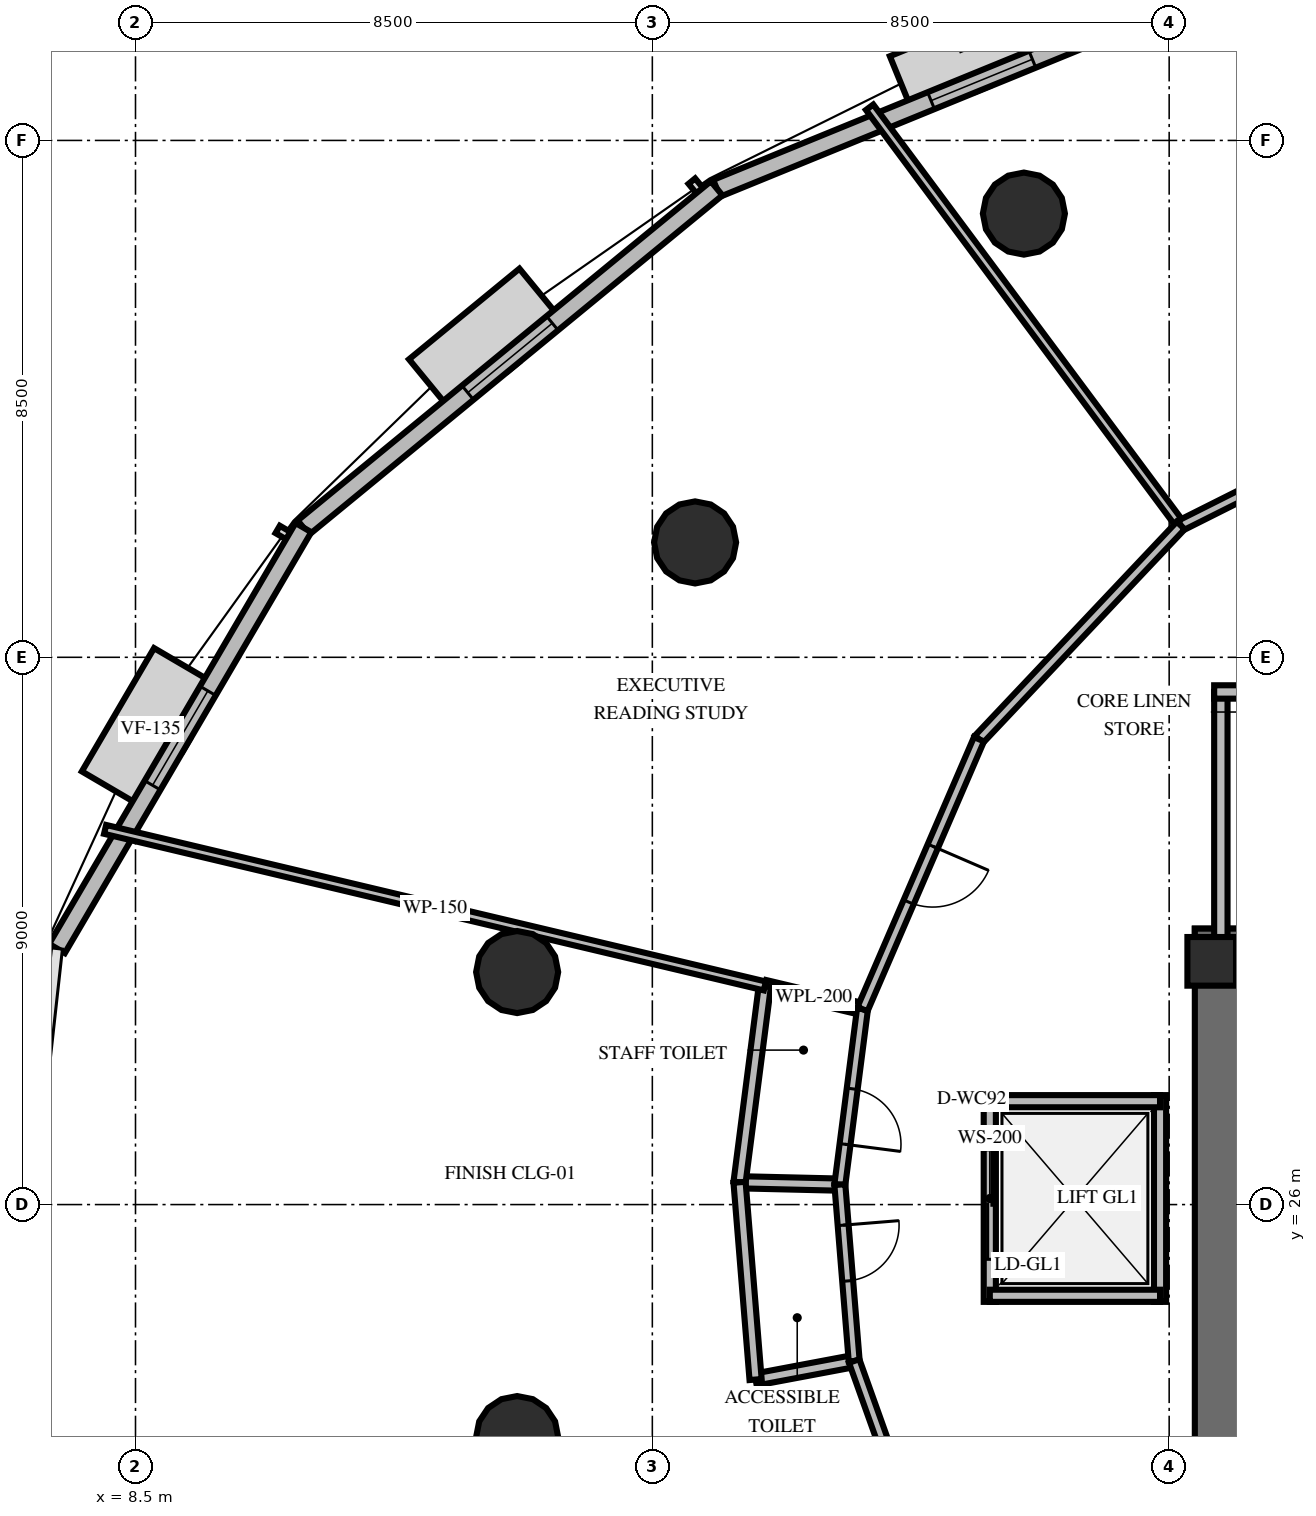
"""IFC4 building model, lengths in metres.
Left out: names, types, materials, properties, quantities, classifications, styles, units other than length and angle.
Written with IfcOpenShell. Run it as: python <this file> out.ifc"""

import sys

from ifc_helpers import new_model, si_unit, direction, frame, frame_2d, origin, origin_2d, place, context, subcontext, project, spatial, rectangle, circle, extrude, element, fill, save


model = new_model("IFC4")
c1 = context("Model", 3, precision=1e-05, world=origin(), true_north=direction((0.0, 1.0)))
c2 = subcontext(c1, "Body", "Model", "MODEL_VIEW")
j1 = project(units=[si_unit("LENGTHUNIT", "METRE"), si_unit("PLANEANGLEUNIT", "RADIAN")], contexts=[c1])
p1 = place(None, origin())
s1 = spatial("IfcSite", under=j1, at=p1, CompositionType="ELEMENT")
p2 = place(p1, origin())
s2 = spatial("IfcBuilding", under=s1, at=p2, CompositionType="ELEMENT")
p3 = place(p2, frame((0.0, 0.0, 59.4)))
s3 = spatial("IfcBuildingStorey", under=s2, at=p3, CompositionType="ELEMENT", Elevation=59.4)
p4 = place(p3, frame((25.922, 30.088, 0.0), z_axis=(0.0, 0.0, 1.0), x_axis=(1.0, 0.0, 0.0)))
e1 = element("IfcWall", 1, at=p4, inside=s3, PredefinedType="SHEAR", context=c2, shape_type="SweptSolid", body=[
    extrude(rectangle(XDim=16.166, YDim=0.9, at=frame_2d((8.083, 0.0))), origin(), (0.0, 0.0, 1.0), 4.2),
])
p5 = place(p4, frame((1.028, 0.0, 0.0)))
e2 = element("IfcOpeningElement", 2, at=p5, cuts=e1, PredefinedType="OPENING", context=c2, shape_type="SweptSolid", body=[
    extrude(rectangle(XDim=1.05, YDim=2.15, at=frame_2d((0.525, 1.075))), frame((0.0, 0.46, 0.0), z_axis=(0.0, -1.0, 0.0), x_axis=(1.0, 0.0, 0.0)), (0.0, 0.0, 1.0), 0.92),
])
p6 = place(p4, frame((14.078, 0.0, 0.0)))
e3 = element("IfcOpeningElement", 3, at=p6, cuts=e1, PredefinedType="OPENING", context=c2, shape_type="SweptSolid", body=[
    extrude(rectangle(XDim=1.05, YDim=2.15, at=frame_2d((0.525, 1.075))), frame((0.0, 0.46, 0.0), z_axis=(0.0, -1.0, 0.0), x_axis=(1.0, 0.0, 0.0)), (0.0, 0.0, 1.0), 0.92),
])
p7 = place(p4, frame((7.528, 0.0, 0.0)))
e4 = element("IfcOpeningElement", 4, at=p7, cuts=e1, PredefinedType="OPENING", context=c2, shape_type="SweptSolid", body=[
    extrude(rectangle(XDim=1.1, YDim=2.15, at=frame_2d((0.55, 1.075))), frame((0.0, 0.46, 0.0), z_axis=(0.0, -1.0, 0.0), x_axis=(1.0, 0.0, 0.0)), (0.0, 0.0, 1.0), 0.92),
])
p8 = place(p3, frame((26.372, 19.662, 0.0), z_axis=(0.0, 0.0, 1.0), x_axis=(0.0, 1.0, 0.0)))
e5 = element("IfcWall", 5, at=p8, inside=s3, PredefinedType="SHEAR", context=c2, shape_type="SweptSolid", body=[
    extrude(rectangle(XDim=10.876, YDim=0.9, at=frame_2d((5.438, 0.0))), origin(), (0.0, 0.0, 1.0), 4.2),
])
p9 = place(p3, frame((26.2, 30.0, 0.0), z_axis=(0.0, 0.0, 1.0), x_axis=(1.0, 0.0, 0.0)))
e6 = element("IfcColumn", 6, at=p9, inside=s3, PredefinedType="PILASTER", context=c2, shape_type="SweptSolid", body=[
    extrude(rectangle(XDim=0.8, YDim=0.8, at=origin_2d()), origin(), (0.0, 0.0, 1.0), 4.2),
])
for number, where, z_axis, x_axis in (
    (7, (23.111, 42.297, 0.0), (0.0, 0.0, 1.0), (1.0, 0.0, 0.0)),
    (8, (17.703, 36.889, 0.0), (0.0, 0.0, 1.0), (1.0, 0.0, 0.0)),
    (9, (14.777, 29.824, 0.0), (0.0, 0.0, 1.0), (1.0, 0.0, 0.0)),
    (10, (14.777, 22.176, 0.0), (0.0, 0.0, 1.0), (1.0, 0.0, 0.0)),
):
    element("IfcColumn", number, at=place(p3, frame(where, z_axis=z_axis, x_axis=x_axis)), inside=s3, PredefinedType="COLUMN", context=c2, shape_type="SweptSolid", body=[
        extrude(circle(Radius=0.675, at=origin_2d()), origin(), (0.0, 0.0, 1.0), 4.2),
    ])
p10 = place(p3, frame((26.776, 46.276, 0.0), z_axis=(0.0, 0.0, 1.0), x_axis=(-0.925665413504, -0.378343154084, 0.0)))
e11 = element("IfcWall", 11, at=p10, inside=s3, PredefinedType="SOLIDWALL", context=c2, shape_type="SweptSolid", body=[
    extrude(rectangle(XDim=9.419, YDim=0.3, at=frame_2d((4.709, 0.0))), origin(), (0.0, 0.0, 1.0), 3.0),
])
p11 = place(p10, frame((3.809, 0.0, 0.8)))
e12 = element("IfcOpeningElement", 12, at=p11, cuts=e11, PredefinedType="OPENING", context=c2, shape_type="SweptSolid", body=[
    extrude(rectangle(XDim=1.8, YDim=1.95, at=frame_2d((0.9, 0.975))), frame((0.0, 0.16, 0.0), z_axis=(0.0, -1.0, 0.0), x_axis=(1.0, 0.0, 0.0)), (0.0, 0.0, 1.0), 0.32),
])
p12 = place(p3, frame((18.057, 42.713, 0.0), z_axis=(0.0, 0.0, 1.0), x_axis=(-0.77286874502, -0.634565916964, 0.0)))
e13 = element("IfcWall", 13, at=p12, inside=s3, PredefinedType="SOLIDWALL", context=c2, shape_type="SweptSolid", body=[
    extrude(rectangle(XDim=8.793, YDim=0.3, at=frame_2d((4.396, 0.0))), origin(), (0.0, 0.0, 1.0), 3.0),
])
p13 = place(p12, frame((3.496, 0.0, 0.8)))
e14 = element("IfcOpeningElement", 14, at=p13, cuts=e13, PredefinedType="OPENING", context=c2, shape_type="SweptSolid", body=[
    extrude(rectangle(XDim=1.8, YDim=1.95, at=frame_2d((0.9, 0.975))), frame((0.0, 0.16, 0.0), z_axis=(0.0, -1.0, 0.0), x_axis=(1.0, 0.0, 0.0)), (0.0, 0.0, 1.0), 0.32),
])
p14 = place(p3, frame((11.262, 37.133, 0.0), z_axis=(0.0, 0.0, 1.0), x_axis=(-0.505259367274, -0.862967538081, 0.0)))
e15 = element("IfcWall", 15, at=p14, inside=s3, PredefinedType="SOLIDWALL", context=c2, shape_type="SweptSolid", body=[
    extrude(rectangle(XDim=8.021, YDim=0.3, at=frame_2d((4.011, 0.0))), origin(), (0.0, 0.0, 1.0), 3.0),
])
p15 = place(p14, frame((3.111, 0.0, 0.8)))
e16 = element("IfcOpeningElement", 16, at=p15, cuts=e15, PredefinedType="OPENING", context=c2, shape_type="SweptSolid", body=[
    extrude(rectangle(XDim=1.8, YDim=1.95, at=frame_2d((0.9, 0.975))), frame((0.0, 0.16, 0.0), z_axis=(0.0, -1.0, 0.0), x_axis=(1.0, 0.0, 0.0)), (0.0, 0.0, 1.0), 0.32),
])
p16 = place(p3, frame((26.35, 30.05, 0.0), z_axis=(0.0, 0.0, 1.0), x_axis=(0.0, 1.0, 0.0)))
e17 = element("IfcWall", 17, at=p16, inside=s3, PredefinedType="SOLIDWALL", context=c2, shape_type="SweptSolid", body=[
    extrude(rectangle(XDim=4.38, YDim=0.22, at=frame_2d((2.19, 0.0))), origin(), (0.0, 0.0, 1.0), 3.0),
])
p17 = place(p3, frame((26.24, 34.43, 0.0), z_axis=(0.0, 0.0, 1.0), x_axis=(1.0, 0.0, 0.0)))
e18 = element("IfcWall", 18, at=p17, inside=s3, PredefinedType="SOLIDWALL", context=c2, shape_type="SweptSolid", body=[
    extrude(rectangle(XDim=4.31, YDim=0.22, at=frame_2d((2.155, 0.0))), origin(), (0.0, 0.0, 1.0), 3.0),
])
p18 = place(p17, frame((1.6, 0.0, 0.0)))
e19 = element("IfcOpeningElement", 19, at=p18, cuts=e18, PredefinedType="OPENING", context=c2, shape_type="SweptSolid", body=[
    extrude(rectangle(XDim=1.1, YDim=2.15, at=frame_2d((0.55, 1.075))), frame((0.0, 0.12, 0.0), z_axis=(0.0, -1.0, 0.0), x_axis=(1.0, 0.0, 0.0)), (0.0, 0.0, 1.0), 0.24),
])
p19 = place(p3, frame((22.55, 24.4, 0.0), z_axis=(0.0, 0.0, 1.0), x_axis=(0.0, 1.0, 0.0)))
e20 = element("IfcWall", 20, at=p19, inside=s3, PredefinedType="SOLIDWALL", context=c2, shape_type="SweptSolid", body=[
    extrude(rectangle(XDim=3.4, YDim=0.2, at=frame_2d((1.7, 0.0))), origin(), (0.0, 0.0, 1.0), 3.0),
])
p20 = place(p19, frame((0.7, 0.0, 0.0)))
e21 = element("IfcOpeningElement", 21, at=p20, cuts=e20, PredefinedType="OPENING", context=c2, shape_type="SweptSolid", body=[
    extrude(rectangle(XDim=1.8, YDim=2.4, at=frame_2d((0.9, 1.2))), frame((0.0, 0.11, 0.0), z_axis=(0.0, -1.0, 0.0), x_axis=(1.0, 0.0, 0.0)), (0.0, 0.0, 1.0), 0.22),
])
p21 = place(p3, frame((25.35, 24.4, 0.0), z_axis=(0.0, 0.0, 1.0), x_axis=(0.0, 1.0, 0.0)))
e22 = element("IfcWall", 22, at=p21, inside=s3, PredefinedType="SOLIDWALL", context=c2, shape_type="SweptSolid", body=[
    extrude(rectangle(XDim=3.4, YDim=0.2, at=frame_2d((1.7, 0.0))), origin(), (0.0, 0.0, 1.0), 3.0),
])
for number, where, z_axis, x_axis in (
    (23, (22.55, 24.5, 0.0), (0.0, 0.0, 1.0), (1.0, 0.0, 0.0)),
    (24, (22.55, 27.7, 0.0), (0.0, 0.0, 1.0), (1.0, 0.0, 0.0)),
):
    element("IfcWall", number, at=place(p3, frame(where, z_axis=z_axis, x_axis=x_axis)), inside=s3, PredefinedType="SOLIDWALL", context=c2, shape_type="SweptSolid", body=[
        extrude(rectangle(XDim=2.8, YDim=0.2, at=frame_2d((1.4, 0.0))), origin(), (0.0, 0.0, 1.0), 3.0),
    ])
for number, where, z_axis, x_axis in (
    (25, (20.456, 29.214, 0.0), (0.0, 0.0, 1.0), (-0.973, 0.231, 0.0)),
    (26, (20.084, 26.328, 0.0), (0.0, 0.0, 1.0), (-1.0, 0.024, 0.0)),
):
    element("IfcWall", number, at=place(p3, frame(where, z_axis=z_axis, x_axis=x_axis)), inside=s3, PredefinedType="PLUMBINGWALL", context=c2, shape_type="SweptSolid", body=[
        extrude(rectangle(XDim=1.65, YDim=0.2, at=frame_2d((0.825, 0.0))), origin(), (0.0, 0.0, 1.0), 3.0),
    ])
p22 = place(p3, frame((18.851, 29.595, 0.0), z_axis=(0.0, 0.0, 1.0), x_axis=(-0.127873768861, -0.991790451273, 0.0)))
e27 = element("IfcWall", 27, at=p22, inside=s3, PredefinedType="PLUMBINGWALL", context=c2, shape_type="SweptSolid", body=[
    extrude(rectangle(XDim=3.255, YDim=0.2, at=frame_2d((1.627, 0.0))), origin(), (0.0, 0.0, 1.0), 3.0),
])
p23 = place(p3, frame((20.456, 29.214, 0.0), z_axis=(0.0, 0.0, 1.0), x_axis=(-0.127854211664, -0.991792972631, 0.0)))
e28 = element("IfcWall", 28, at=p23, inside=s3, PredefinedType="PARTITIONING", context=c2, shape_type="SweptSolid", body=[
    extrude(rectangle(XDim=2.91, YDim=0.18, at=frame_2d((1.455, 0.0))), origin(), (0.0, 0.0, 1.0), 3.0),
])
p24 = place(p23, frame((1.321, 0.0, 0.0)))
e29 = element("IfcOpeningElement", 29, at=p24, cuts=e28, PredefinedType="OPENING", context=c2, shape_type="SweptSolid", body=[
    extrude(rectangle(XDim=0.92, YDim=2.1, at=frame_2d((0.46, 1.05))), frame((0.0, 0.1, 0.0), z_axis=(0.0, -1.0, 0.0), x_axis=(1.0, 0.0, 0.0)), (0.0, 0.0, 1.0), 0.2),
])
p25 = place(p3, frame((20.32, 23.427, 0.0), z_axis=(0.0, 0.0, 1.0), x_axis=(-0.98277489683, -0.184806661569, 0.0)))
e30 = element("IfcWall", 30, at=p25, inside=s3, PredefinedType="PLUMBINGWALL", context=c2, shape_type="SweptSolid", body=[
    extrude(rectangle(XDim=1.65, YDim=0.2, at=frame_2d((0.825, 0.0))), origin(), (0.0, 0.0, 1.0), 3.0),
])
p26 = place(p3, frame((18.434, 26.367, 0.0), z_axis=(0.0, 0.0, 1.0), x_axis=(0.0810837285, -0.996707293528, 0.0)))
e31 = element("IfcWall", 31, at=p26, inside=s3, PredefinedType="PLUMBINGWALL", context=c2, shape_type="SweptSolid", body=[
    extrude(rectangle(XDim=3.255, YDim=0.2, at=frame_2d((1.627, 0.0))), origin(), (0.0, 0.0, 1.0), 3.0),
])
p27 = place(p3, frame((20.084, 26.328, 0.0), z_axis=(0.0, 0.0, 1.0), x_axis=(0.081045642914, -0.996710391119, 0.0)))
e32 = element("IfcWall", 32, at=p27, inside=s3, PredefinedType="PARTITIONING", context=c2, shape_type="SweptSolid", body=[
    extrude(rectangle(XDim=2.91, YDim=0.18, at=frame_2d((1.455, 0.0))), origin(), (0.0, 0.0, 1.0), 3.0),
])
p28 = place(p27, frame((0.669, 0.0, 0.0)))
e33 = element("IfcOpeningElement", 33, at=p28, cuts=e32, PredefinedType="OPENING", context=c2, shape_type="SweptSolid", body=[
    extrude(rectangle(XDim=0.92, YDim=2.1, at=frame_2d((0.46, 1.05))), frame((0.0, 0.1, 0.0), z_axis=(0.0, -1.0, 0.0), x_axis=(1.0, 0.0, 0.0)), (0.0, 0.0, 1.0), 0.2),
])
p29 = place(p3, frame((18.851, 29.595, 0.0), z_axis=(0.0, 0.0, 1.0), x_axis=(-0.972979291155, 0.230892396981, 0.0)))
e34 = element("IfcWall", 34, at=p29, inside=s3, PredefinedType="PARTITIONING", context=c2, shape_type="SweptSolid", body=[
    extrude(rectangle(XDim=11.152, YDim=0.15, at=frame_2d((5.576, 0.0))), origin(), (0.0, 0.0, 1.0), 3.0),
])
p30 = place(p3, frame((20.32, 23.427, 0.0), z_axis=(0.0, 0.0, 1.0), x_axis=(0.33623696161, -0.941777418315, 0.0)))
e35 = element("IfcWall", 35, at=p30, inside=s3, PredefinedType="PARTITIONING", context=c2, shape_type="SweptSolid", body=[
    extrude(rectangle(XDim=4.355, YDim=0.18, at=frame_2d((2.178, 0.0))), origin(), (0.0, 0.0, 1.0), 3.0),
])
p31 = place(p30, frame((2.441, 0.0, 0.0)))
e36 = element("IfcOpeningElement", 36, at=p31, cuts=e35, PredefinedType="OPENING", context=c2, shape_type="SweptSolid", body=[
    extrude(rectangle(XDim=1.0, YDim=2.15, at=frame_2d((0.5, 1.075))), frame((0.0, 0.1, 0.0), z_axis=(0.0, -1.0, 0.0), x_axis=(1.0, 0.0, 0.0)), (0.0, 0.0, 1.0), 0.2),
])
p32 = place(p3, frame((25.691, 37.168, 0.0), z_axis=(0.0, 0.0, 1.0), x_axis=(-0.596933618422, 0.802290630132, 0.0)))
e37 = element("IfcWall", 37, at=p32, inside=s3, PredefinedType="PARTITIONING", context=c2, shape_type="SweptSolid", body=[
    extrude(rectangle(XDim=8.573, YDim=0.15, at=frame_2d((4.286, 0.0))), origin(), (0.0, 0.0, 1.0), 3.0),
])
p33 = place(p3, frame((30.012, 39.336, 0.0), z_axis=(0.0, 0.0, 1.0), x_axis=(-0.893759589468, -0.44854631448, 0.0)))
e38 = element("IfcWall", 38, at=p33, inside=s3, PredefinedType="PARTITIONING", context=c2, shape_type="SweptSolid", body=[
    extrude(rectangle(XDim=4.834, YDim=0.18, at=frame_2d((2.417, 0.0))), origin(), (0.0, 0.0, 1.0), 3.0),
])
p34 = place(p33, frame((1.034, 0.0, 0.0)))
e39 = element("IfcOpeningElement", 39, at=p34, cuts=e38, PredefinedType="OPENING", context=c2, shape_type="SweptSolid", body=[
    extrude(rectangle(XDim=1.0, YDim=2.15, at=frame_2d((0.5, 1.075))), frame((0.0, 0.1, 0.0), z_axis=(0.0, -1.0, 0.0), x_axis=(1.0, 0.0, 0.0)), (0.0, 0.0, 1.0), 0.2),
])
p35 = place(p3, frame((25.691, 37.168, 0.0), z_axis=(0.0, 0.0, 1.0), x_axis=(-0.68646187942, -0.727165791346, 0.0)))
e40 = element("IfcWall", 40, at=p35, inside=s3, PredefinedType="PARTITIONING", context=c2, shape_type="SweptSolid", body=[
    extrude(rectangle(XDim=4.834, YDim=0.18, at=frame_2d((2.417, 0.0))), origin(), (0.0, 0.0, 1.0), 3.0),
])
p36 = place(p3, frame((22.372, 33.653, 0.0), z_axis=(0.0, 0.0, 1.0), x_axis=(-0.396374105142, -0.918089085423, 0.0)))
e41 = element("IfcWall", 41, at=p36, inside=s3, PredefinedType="PARTITIONING", context=c2, shape_type="SweptSolid", body=[
    extrude(rectangle(XDim=4.834, YDim=0.18, at=frame_2d((2.417, 0.0))), origin(), (0.0, 0.0, 1.0), 3.0),
])
p37 = place(p36, frame((1.917, 0.0, 0.0)))
e42 = element("IfcOpeningElement", 42, at=p37, cuts=e41, PredefinedType="OPENING", context=c2, shape_type="SweptSolid", body=[
    extrude(rectangle(XDim=1.0, YDim=2.15, at=frame_2d((0.5, 1.075))), frame((0.0, 0.1, 0.0), z_axis=(0.0, -1.0, 0.0), x_axis=(1.0, 0.0, 0.0)), (0.0, 0.0, 1.0), 0.2),
])
p38 = place(p11, origin())
e43 = element("IfcWindow", 43, at=p38, inside=s3, PartitioningType="SINGLE_PANEL", PredefinedType="WINDOW", context=c2, shape_type="SweptSolid", body=[
    extrude(rectangle(XDim=1.8, YDim=1.95, at=frame_2d((0.9, 0.975))), frame((0.0, 0.03, 0.0), z_axis=(0.0, -1.0, 0.0), x_axis=(1.0, 0.0, 0.0)), (0.0, 0.0, 1.0), 0.06),
])
fill(e12, e43)
p39 = place(p13, origin())
e44 = element("IfcWindow", 44, at=p39, inside=s3, PartitioningType="SINGLE_PANEL", PredefinedType="WINDOW", context=c2, shape_type="SweptSolid", body=[
    extrude(rectangle(XDim=1.8, YDim=1.95, at=frame_2d((0.9, 0.975))), frame((0.0, 0.03, 0.0), z_axis=(0.0, -1.0, 0.0), x_axis=(1.0, 0.0, 0.0)), (0.0, 0.0, 1.0), 0.06),
])
fill(e14, e44)
p40 = place(p15, origin())
e45 = element("IfcWindow", 45, at=p40, inside=s3, PartitioningType="SINGLE_PANEL", PredefinedType="WINDOW", context=c2, shape_type="SweptSolid", body=[
    extrude(rectangle(XDim=1.8, YDim=1.95, at=frame_2d((0.9, 0.975))), frame((0.0, 0.03, 0.0), z_axis=(0.0, -1.0, 0.0), x_axis=(1.0, 0.0, 0.0)), (0.0, 0.0, 1.0), 0.06),
])
fill(e16, e45)
p41 = place(p20, origin())
e46 = element("IfcDoor", 46, at=p41, inside=s3, OperationType="DOUBLE_DOOR_SLIDING", PredefinedType="USERDEFINED", context=c2, shape_type="SweptSolid", body=[
    extrude(rectangle(XDim=1.8, YDim=2.4, at=frame_2d((0.9, 1.2))), frame((0.0, 0.025, 0.0), z_axis=(0.0, -1.0, 0.0), x_axis=(1.0, 0.0, 0.0)), (0.0, 0.0, 1.0), 0.05),
])
fill(e21, e46)
p42 = place(p24, origin())
e47 = element("IfcDoor", 47, at=p42, inside=s3, OperationType="SINGLE_SWING_RIGHT", PredefinedType="DOOR", context=c2, shape_type="SweptSolid", body=[
    extrude(rectangle(XDim=0.92, YDim=2.1, at=frame_2d((0.46, 1.05))), frame((0.0, 0.025, 0.0), z_axis=(0.0, -1.0, 0.0), x_axis=(1.0, 0.0, 0.0)), (0.0, 0.0, 1.0), 0.05),
])
fill(e29, e47)
p43 = place(p28, origin())
e48 = element("IfcDoor", 48, at=p43, inside=s3, OperationType="SINGLE_SWING_LEFT", PredefinedType="DOOR", context=c2, shape_type="SweptSolid", body=[
    extrude(rectangle(XDim=0.92, YDim=2.1, at=frame_2d((0.46, 1.05))), frame((0.0, 0.025, 0.0), z_axis=(0.0, -1.0, 0.0), x_axis=(1.0, 0.0, 0.0)), (0.0, 0.0, 1.0), 0.05),
])
fill(e33, e48)
p44 = place(p37, origin())
e49 = element("IfcDoor", 49, at=p44, inside=s3, OperationType="SINGLE_SWING_LEFT", PredefinedType="DOOR", context=c2, shape_type="SweptSolid", body=[
    extrude(rectangle(XDim=1.0, YDim=2.15, at=frame_2d((0.5, 1.075))), frame((0.0, 0.025, 0.0), z_axis=(0.0, -1.0, 0.0), x_axis=(1.0, 0.0, 0.0)), (0.0, 0.0, 1.0), 0.05),
])
fill(e42, e49)
save(model, sys.argv[1])
